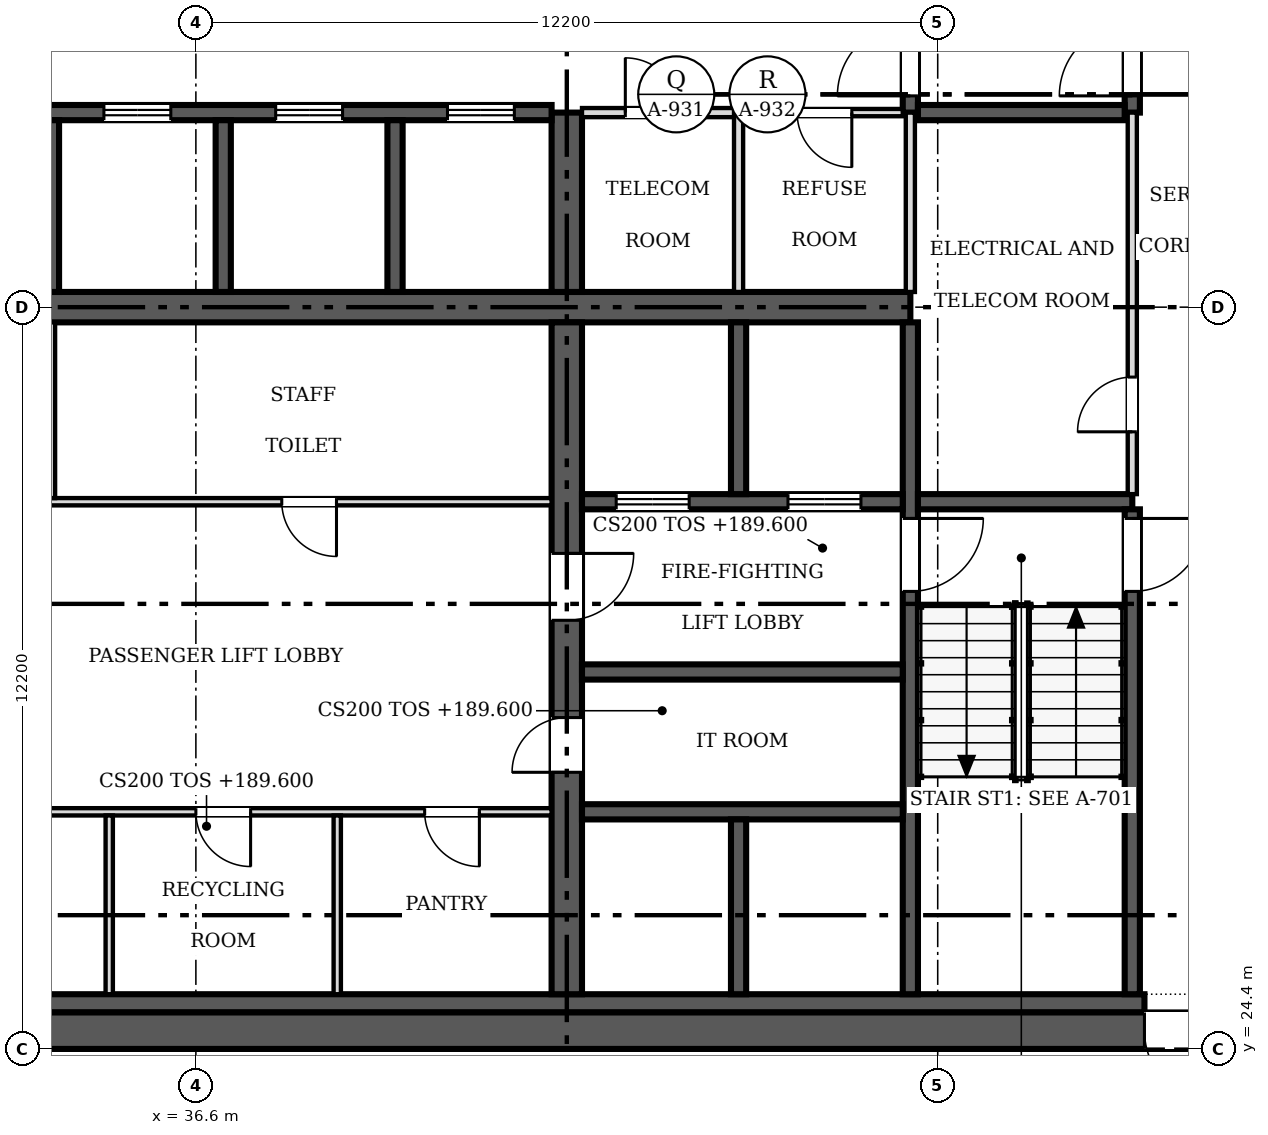
"""IFC4 building model, lengths in metres.
Left out: names, types, materials, properties, quantities, classifications, styles, units other than length and angle.
Written with IfcOpenShell. Run it as: python <this file> out.ifc"""

import sys

from ifc_helpers import new_model, si_unit, direction, frame, frame_2d, origin, place, context, subcontext, project, spatial, rectangle, extrude, source, transform, mapped, element, fill, save


model = new_model("IFC4")
c1 = context("Model", 3, precision=1e-05, world=origin(), true_north=direction((0.0, 1.0)))
c2 = subcontext(c1, "Body", "Model", "MODEL_VIEW")
j1 = project(units=[si_unit("LENGTHUNIT", "METRE"), si_unit("PLANEANGLEUNIT", "RADIAN")], contexts=[c1])
p1 = place(None, origin())
s1 = spatial("IfcSite", under=j1, at=p1, CompositionType="ELEMENT")
p2 = place(p1, origin())
s2 = spatial("IfcBuilding", under=s1, at=p2, CompositionType="ELEMENT")
p3 = place(p2, frame((0.0, 0.0, 189.6)))
s3 = spatial("IfcBuildingStorey", under=s2, at=p3, CompositionType="ELEMENT", Elevation=189.6)
p4 = place(p3, frame((54.9, 24.7, 0.0), z_axis=(0.0, 0.0, 1.0), x_axis=(-1.0, 0.0, 0.0)))
e1 = element("IfcWall", 1, at=p4, inside=s3, PredefinedType="SHEAR", context=c2, shape_type="SweptSolid", body=[
    extrude(rectangle(XDim=24.4, YDim=0.6, at=frame_2d((12.2, 0.0))), origin(), (0.0, 0.0, 1.0), 3.8),
])
m1 = source(origin(), c2, "Body", "SweptSolid", [
    extrude(rectangle(XDim=1.2, YDim=2.1, at=frame_2d((0.6, 1.05))), frame((0.0, 0.31, 0.0), z_axis=(0.0, -1.0, 0.0), x_axis=(1.0, 0.0, 0.0)), (0.0, 0.0, 1.0), 0.62),
])
p5 = place(p4, frame((1.5, 0.0, 0.0)))
e2 = element("IfcOpeningElement", 2, at=p5, cuts=e1, PredefinedType="OPENING", context=c2, shape_type="MappedRepresentation", body=[
    mapped(m1, transform((0.0, 0.0, 0.0), scale=1.0)),
])
p6 = place(p3, frame((31.1, 25.15, 0.0), z_axis=(0.0, 0.0, 1.0), x_axis=(1.0, 0.0, 0.0)))
e3 = element("IfcWall", 3, at=p6, inside=s3, PredefinedType="SOLIDWALL", context=c2, shape_type="SweptSolid", body=[
    extrude(rectangle(XDim=21.1, YDim=0.3, at=frame_2d((10.55, 0.0))), origin(), (0.0, 0.0, 1.0), 3.8),
])
p7 = place(p3, frame((31.4, 36.6, 0.0), z_axis=(0.0, 0.0, 1.0), x_axis=(1.0, 0.0, 0.0)))
e4 = element("IfcWall", 4, at=p7, inside=s3, PredefinedType="SHEAR", context=c2, shape_type="SweptSolid", body=[
    extrude(rectangle(XDim=16.95, YDim=0.5, at=frame_2d((8.475, 0.0))), origin(), (0.0, 0.0, 1.0), 3.8),
])
p8 = place(p3, frame((42.7, 36.35, 0.0), z_axis=(0.0, 0.0, 1.0), x_axis=(0.0, -1.0, 0.0)))
e5 = element("IfcWall", 5, at=p8, inside=s3, PredefinedType="SHEAR", context=c2, shape_type="SweptSolid", body=[
    extrude(rectangle(XDim=11.05, YDim=0.5, at=frame_2d((5.525, 0.0))), origin(), (0.0, 0.0, 1.0), 3.8),
])
m2 = source(origin(), c2, "Body", "SweptSolid", [
    extrude(rectangle(XDim=0.9, YDim=2.1, at=frame_2d((0.45, 1.05))), frame((0.0, 0.26, 0.0), z_axis=(0.0, -1.0, 0.0), x_axis=(1.0, 0.0, 0.0)), (0.0, 0.0, 1.0), 0.52),
])
p9 = place(p8, frame((6.5, 0.0, 0.0)))
e6 = element("IfcOpeningElement", 6, at=p9, cuts=e5, PredefinedType="OPENING", context=c2, shape_type="MappedRepresentation", body=[
    mapped(m2, transform((0.0, 0.0, 0.0), scale=1.0)),
])
m3 = source(origin(), c2, "Body", "SweptSolid", [
    extrude(rectangle(XDim=1.1, YDim=2.1, at=frame_2d((0.55, 1.05))), frame((0.0, 0.26, 0.0), z_axis=(0.0, -1.0, 0.0), x_axis=(1.0, 0.0, 0.0)), (0.0, 0.0, 1.0), 0.52),
])
p10 = place(p8, frame((3.8, 0.0, 0.0)))
e7 = element("IfcOpeningElement", 7, at=p10, cuts=e5, PredefinedType="OPENING", context=c2, shape_type="MappedRepresentation", body=[
    mapped(m3, transform((0.0, 0.0, 0.0), scale=1.0)),
])
p11 = place(p3, frame((42.7, 36.85, 0.0), z_axis=(0.0, 0.0, 1.0), x_axis=(0.0, 1.0, 0.0)))
e8 = element("IfcWall", 8, at=p11, inside=s3, PredefinedType="SHEAR", context=c2, shape_type="SweptSolid", body=[
    extrude(rectangle(XDim=2.95, YDim=0.5, at=frame_2d((1.475, 0.0))), origin(), (0.0, 0.0, 1.0), 3.8),
])
p12 = place(p3, frame((31.4, 39.8, 0.0), z_axis=(0.0, 0.0, 1.0), x_axis=(1.0, 0.0, 0.0)))
e9 = element("IfcWall", 9, at=p12, inside=s3, PredefinedType="SOLIDWALL", context=c2, shape_type="SweptSolid", body=[
    extrude(rectangle(XDim=11.05, YDim=0.25, at=frame_2d((5.525, 0.0))), origin(), (0.0, 0.0, 1.0), 3.8),
])
m4 = source(origin(), c2, "Body", "SweptSolid", [
    extrude(rectangle(XDim=1.1, YDim=2.1, at=frame_2d((0.55, 1.05))), frame((0.0, 0.135, 0.0), z_axis=(0.0, -1.0, 0.0), x_axis=(1.0, 0.0, 0.0)), (0.0, 0.0, 1.0), 0.27),
])
p13 = place(p12, frame((0.863, 0.0, 0.0)))
e10 = element("IfcOpeningElement", 10, at=p13, cuts=e9, PredefinedType="OPENING", context=c2, shape_type="MappedRepresentation", body=[
    mapped(m4, transform((0.0, 0.0, 0.0), scale=1.0)),
])
p14 = place(p12, frame((3.688, 0.0, 0.0)))
e11 = element("IfcOpeningElement", 11, at=p14, cuts=e9, PredefinedType="OPENING", context=c2, shape_type="MappedRepresentation", body=[
    mapped(m4, transform((0.0, 0.0, 0.0), scale=1.0)),
])
p15 = place(p12, frame((6.512, 0.0, 0.0)))
e12 = element("IfcOpeningElement", 12, at=p15, cuts=e9, PredefinedType="OPENING", context=c2, shape_type="MappedRepresentation", body=[
    mapped(m4, transform((0.0, 0.0, 0.0), scale=1.0)),
])
p16 = place(p12, frame((9.337, 0.0, 0.0)))
e13 = element("IfcOpeningElement", 13, at=p16, cuts=e9, PredefinedType="OPENING", context=c2, shape_type="MappedRepresentation", body=[
    mapped(m4, transform((0.0, 0.0, 0.0), scale=1.0)),
])
p17 = place(p3, frame((48.35, 36.35, 0.0), z_axis=(0.0, 0.0, 1.0), x_axis=(0.0, -1.0, 0.0)))
e14 = element("IfcWall", 14, at=p17, inside=s3, PredefinedType="SOLIDWALL", context=c2, shape_type="SweptSolid", body=[
    extrude(rectangle(XDim=11.05, YDim=0.25, at=frame_2d((5.525, 0.0))), origin(), (0.0, 0.0, 1.0), 3.8),
])
m5 = source(origin(), c2, "Body", "SweptSolid", [
    extrude(rectangle(XDim=1.2, YDim=2.1, at=frame_2d((0.6, 1.05))), frame((0.0, 0.135, 0.0), z_axis=(0.0, -1.0, 0.0), x_axis=(1.0, 0.0, 0.0)), (0.0, 0.0, 1.0), 0.27),
])
p18 = place(p17, frame((3.225, 0.0, 0.0)))
e15 = element("IfcOpeningElement", 15, at=p18, cuts=e14, PredefinedType="OPENING", context=c2, shape_type="MappedRepresentation", body=[
    mapped(m5, transform((0.0, 0.0, 0.0), scale=1.0)),
])
p19 = place(p3, frame((48.225, 33.4, 0.0), z_axis=(0.0, 0.0, 1.0), x_axis=(-1.0, 0.0, 0.0)))
e16 = element("IfcWall", 16, at=p19, inside=s3, PredefinedType="SOLIDWALL", context=c2, shape_type="SweptSolid", body=[
    extrude(rectangle(XDim=5.275, YDim=0.25, at=frame_2d((2.638, 0.0))), origin(), (0.0, 0.0, 1.0), 3.8),
])
p20 = place(p19, frame((3.512, 0.0, 0.0)))
e17 = element("IfcOpeningElement", 17, at=p20, cuts=e16, PredefinedType="OPENING", context=c2, shape_type="MappedRepresentation", body=[
    mapped(m5, transform((0.0, 0.0, 0.0), scale=1.0)),
])
p21 = place(p19, frame((0.688, 0.0, 0.0)))
e18 = element("IfcOpeningElement", 18, at=p21, cuts=e16, PredefinedType="OPENING", context=c2, shape_type="MappedRepresentation", body=[
    mapped(m5, transform((0.0, 0.0, 0.0), scale=1.0)),
])
p22 = place(p3, frame((48.475, 33.4, 0.0), z_axis=(0.0, 0.0, 1.0), x_axis=(1.0, 0.0, 0.0)))
e19 = element("IfcWall", 19, at=p22, inside=s3, PredefinedType="SOLIDWALL", context=c2, shape_type="SweptSolid", body=[
    extrude(rectangle(XDim=3.525, YDim=0.25, at=frame_2d((1.762, 0.0))), origin(), (0.0, 0.0, 1.0), 3.8),
])
p23 = place(p3, frame((48.35, 47.9, 0.0), z_axis=(0.0, 0.0, 1.0), x_axis=(0.0, -1.0, 0.0)))
e20 = element("IfcWall", 20, at=p23, inside=s3, PredefinedType="SOLIDWALL", context=c2, shape_type="SweptSolid", body=[
    extrude(rectangle(XDim=8.1, YDim=0.25, at=frame_2d((4.05, 0.0))), origin(), (0.0, 0.0, 1.0), 3.8),
])
p24 = place(p23, frame((6.625, 0.0, 0.0)))
e21 = element("IfcOpeningElement", 21, at=p24, cuts=e20, PredefinedType="OPENING", context=c2, shape_type="MappedRepresentation", body=[
    mapped(m5, transform((0.0, 0.0, 0.0), scale=1.0)),
])
p25 = place(p3, frame((52.0, 25.3, 0.0), z_axis=(0.0, 0.0, 1.0), x_axis=(0.0, 1.0, 0.0)))
e22 = element("IfcWall", 22, at=p25, inside=s3, PredefinedType="SOLIDWALL", context=c2, shape_type="SweptSolid", body=[
    extrude(rectangle(XDim=7.975, YDim=0.25, at=frame_2d((3.987, 0.0))), origin(), (0.0, 0.0, 1.0), 3.8),
])
p26 = place(p25, frame((6.625, 0.0, 0.0)))
e23 = element("IfcOpeningElement", 23, at=p26, cuts=e22, PredefinedType="OPENING", context=c2, shape_type="MappedRepresentation", body=[
    mapped(m5, transform((0.0, 0.0, 0.0), scale=1.0)),
])
p27 = place(p3, frame((52.0, 39.8, 0.0), z_axis=(0.0, 0.0, 1.0), x_axis=(0.0, 1.0, 0.0)))
e24 = element("IfcWall", 24, at=p27, inside=s3, PredefinedType="SOLIDWALL", context=c2, shape_type="SweptSolid", body=[
    extrude(rectangle(XDim=8.1, YDim=0.25, at=frame_2d((4.05, 0.0))), origin(), (0.0, 0.0, 1.0), 3.8),
])
p28 = place(p27, frame((0.275, 0.0, 0.0)))
e25 = element("IfcOpeningElement", 25, at=p28, cuts=e24, PredefinedType="OPENING", context=c2, shape_type="MappedRepresentation", body=[
    mapped(m5, transform((0.0, 0.0, 0.0), scale=1.0)),
])
for number, where, z_axis, x_axis in (
    (26, (42.95, 28.3, 0.0), (0.0, 0.0, 1.0), (1.0, 0.0, 0.0)),
    (27, (42.95, 30.6, 0.0), (0.0, 0.0, 1.0), (1.0, 0.0, 0.0)),
):
    element("IfcWall", number, at=place(p3, frame(where, z_axis=z_axis, x_axis=x_axis)), inside=s3, PredefinedType="SOLIDWALL", context=c2, shape_type="SweptSolid", body=[
        extrude(rectangle(XDim=5.275, YDim=0.25, at=frame_2d((2.638, 0.0))), origin(), (0.0, 0.0, 1.0), 3.8),
    ])
p29 = place(p3, frame((48.475, 39.8, 0.0), z_axis=(0.0, 0.0, 1.0), x_axis=(1.0, 0.0, 0.0)))
e28 = element("IfcWall", 28, at=p29, inside=s3, PredefinedType="SOLIDWALL", context=c2, shape_type="SweptSolid", body=[
    extrude(rectangle(XDim=3.4, YDim=0.25, at=frame_2d((1.7, 0.0))), origin(), (0.0, 0.0, 1.0), 3.8),
])
for number, where, z_axis, x_axis in (
    (29, (34.225, 36.85, 0.0), (0.0, 0.0, 1.0), (0.0, 1.0, 0.0)),
    (30, (37.05, 36.85, 0.0), (0.0, 0.0, 1.0), (0.0, 1.0, 0.0)),
    (31, (39.875, 36.85, 0.0), (0.0, 0.0, 1.0), (0.0, 1.0, 0.0)),
):
    element("IfcWall", number, at=place(p3, frame(where, z_axis=z_axis, x_axis=x_axis)), inside=s3, PredefinedType="SOLIDWALL", context=c2, shape_type="SweptSolid", body=[
        extrude(rectangle(XDim=2.825, YDim=0.25, at=frame_2d((1.413, 0.0))), origin(), (0.0, 0.0, 1.0), 3.8),
    ])
p30 = place(p3, frame((45.525, 33.525, 0.0), z_axis=(0.0, 0.0, 1.0), x_axis=(0.0, 1.0, 0.0)))
e32 = element("IfcWall", 32, at=p30, inside=s3, PredefinedType="SOLIDWALL", context=c2, shape_type="SweptSolid", body=[
    extrude(rectangle(XDim=2.825, YDim=0.25, at=frame_2d((1.413, 0.0))), origin(), (0.0, 0.0, 1.0), 3.8),
])
p31 = place(p3, frame((45.525, 25.3, 0.0), z_axis=(0.0, 0.0, 1.0), x_axis=(0.0, 1.0, 0.0)))
e33 = element("IfcWall", 33, at=p31, inside=s3, PredefinedType="SOLIDWALL", context=c2, shape_type="SweptSolid", body=[
    extrude(rectangle(XDim=2.875, YDim=0.25, at=frame_2d((1.438, 0.0))), origin(), (0.0, 0.0, 1.0), 3.8),
])
p32 = place(p3, frame((42.45, 28.3, 0.0), z_axis=(0.0, 0.0, 1.0), x_axis=(-1.0, 0.0, 0.0)))
e34 = element("IfcWall", 34, at=p32, inside=s3, PredefinedType="PARTITIONING", context=c2, shape_type="SweptSolid", body=[
    extrude(rectangle(XDim=11.05, YDim=0.12, at=frame_2d((5.525, 0.0))), origin(), (0.0, 0.0, 1.0), 3.55),
])
m6 = source(origin(), c2, "Body", "SweptSolid", [
    extrude(rectangle(XDim=0.9, YDim=2.1, at=frame_2d((0.45, 1.05))), frame((0.0, 0.07, 0.0), z_axis=(0.0, -1.0, 0.0), x_axis=(1.0, 0.0, 0.0)), (0.0, 0.0, 1.0), 0.14),
])
p33 = place(p32, frame((8.712, 0.0, 0.0)))
e35 = element("IfcOpeningElement", 35, at=p33, cuts=e34, PredefinedType="OPENING", context=c2, shape_type="MappedRepresentation", body=[
    mapped(m6, transform((0.0, 0.0, 0.0), scale=1.0)),
])
p34 = place(p32, frame((4.95, 0.0, 0.0)))
e36 = element("IfcOpeningElement", 36, at=p34, cuts=e34, PredefinedType="OPENING", context=c2, shape_type="MappedRepresentation", body=[
    mapped(m6, transform((0.0, 0.0, 0.0), scale=1.0)),
])
p35 = place(p32, frame((1.188, 0.0, 0.0)))
e37 = element("IfcOpeningElement", 37, at=p35, cuts=e34, PredefinedType="OPENING", context=c2, shape_type="MappedRepresentation", body=[
    mapped(m6, transform((0.0, 0.0, 0.0), scale=1.0)),
])
p36 = place(p3, frame((31.4, 33.4, 0.0), z_axis=(0.0, 0.0, 1.0), x_axis=(1.0, 0.0, 0.0)))
e38 = element("IfcWall", 38, at=p36, inside=s3, PredefinedType="PARTITIONING", context=c2, shape_type="SweptSolid", body=[
    extrude(rectangle(XDim=11.05, YDim=0.12, at=frame_2d((5.525, 0.0))), origin(), (0.0, 0.0, 1.0), 3.55),
])
p37 = place(p36, frame((0.962, 0.0, 0.0)))
e39 = element("IfcOpeningElement", 39, at=p37, cuts=e38, PredefinedType="OPENING", context=c2, shape_type="MappedRepresentation", body=[
    mapped(m6, transform((0.0, 0.0, 0.0), scale=1.0)),
])
p38 = place(p36, frame((6.613, 0.0, 0.0)))
e40 = element("IfcOpeningElement", 40, at=p38, cuts=e38, PredefinedType="OPENING", context=c2, shape_type="MappedRepresentation", body=[
    mapped(m6, transform((0.0, 0.0, 0.0), scale=1.0)),
])
p39 = place(p3, frame((52.0, 33.525, 0.0), z_axis=(0.0, 0.0, 1.0), x_axis=(0.0, 1.0, 0.0)))
e41 = element("IfcWall", 41, at=p39, inside=s3, PredefinedType="PARTITIONING", context=c2, shape_type="SweptSolid", body=[
    extrude(rectangle(XDim=6.275, YDim=0.15, at=frame_2d((3.138, 0.0))), origin(), (0.0, 0.0, 1.0), 3.55),
])
m7 = source(origin(), c2, "Body", "SweptSolid", [
    extrude(rectangle(XDim=0.9, YDim=2.1, at=frame_2d((0.45, 1.05))), frame((0.0, 0.085, 0.0), z_axis=(0.0, -1.0, 0.0), x_axis=(1.0, 0.0, 0.0)), (0.0, 0.0, 1.0), 0.17),
])
p40 = place(p39, frame((1.025, 0.0, 0.0)))
e42 = element("IfcOpeningElement", 42, at=p40, cuts=e41, PredefinedType="OPENING", context=c2, shape_type="MappedRepresentation", body=[
    mapped(m7, transform((0.0, 0.0, 0.0), scale=1.0)),
])
for number, where, z_axis, x_axis in (
    (43, (45.525, 36.85, 0.0), (0.0, 0.0, 1.0), (0.0, 1.0, 0.0)),
    (44, (48.35, 36.85, 0.0), (0.0, 0.0, 1.0), (0.0, 1.0, 0.0)),
):
    element("IfcWall", number, at=place(p3, frame(where, z_axis=z_axis, x_axis=x_axis)), inside=s3, PredefinedType="PARTITIONING", context=c2, shape_type="SweptSolid", body=[
        extrude(rectangle(XDim=2.95, YDim=0.15, at=frame_2d((1.475, 0.0))), origin(), (0.0, 0.0, 1.0), 3.55),
    ])
p41 = place(p3, frame((34.225, 33.46, 0.0), z_axis=(0.0, 0.0, 1.0), x_axis=(0.0, 1.0, 0.0)))
e45 = element("IfcWall", 45, at=p41, inside=s3, PredefinedType="PARTITIONING", context=c2, shape_type="SweptSolid", body=[
    extrude(rectangle(XDim=2.89, YDim=0.12, at=frame_2d((1.445, 0.0))), origin(), (0.0, 0.0, 1.0), 3.55),
])
for number, where, z_axis, x_axis in (
    (46, (35.175, 25.3, 0.0), (0.0, 0.0, 1.0), (0.0, 1.0, 0.0)),
    (47, (38.925, 25.3, 0.0), (0.0, 0.0, 1.0), (0.0, 1.0, 0.0)),
):
    element("IfcWall", number, at=place(p3, frame(where, z_axis=z_axis, x_axis=x_axis)), inside=s3, PredefinedType="PARTITIONING", context=c2, shape_type="SweptSolid", body=[
        extrude(rectangle(XDim=2.94, YDim=0.12, at=frame_2d((1.47, 0.0))), origin(), (0.0, 0.0, 1.0), 3.55),
    ])
p42 = place(p3, frame((45.45, 39.8, 0.0), z_axis=(0.0, 0.0, 1.0), x_axis=(-1.0, 0.0, 0.0)))
e48 = element("IfcWall", 48, at=p42, inside=s3, PredefinedType="PARTITIONING", context=c2, shape_type="SweptSolid", body=[
    extrude(rectangle(XDim=2.5, YDim=0.15, at=frame_2d((1.25, 0.0))), origin(), (0.0, 0.0, 1.0), 3.55),
])
p43 = place(p42, frame((0.887, 0.0, 0.0)))
e49 = element("IfcOpeningElement", 49, at=p43, cuts=e48, PredefinedType="OPENING", context=c2, shape_type="MappedRepresentation", body=[
    mapped(m7, transform((0.0, 0.0, 0.0), scale=1.0)),
])
p44 = place(p3, frame((48.225, 39.8, 0.0), z_axis=(0.0, 0.0, 1.0), x_axis=(-1.0, 0.0, 0.0)))
e50 = element("IfcWall", 50, at=p44, inside=s3, PredefinedType="PARTITIONING", context=c2, shape_type="SweptSolid", body=[
    extrude(rectangle(XDim=2.625, YDim=0.12, at=frame_2d((1.312, 0.0))), origin(), (0.0, 0.0, 1.0), 3.55),
])
p45 = place(p44, frame((0.837, 0.0, 0.0)))
e51 = element("IfcOpeningElement", 51, at=p45, cuts=e50, PredefinedType="OPENING", context=c2, shape_type="MappedRepresentation", body=[
    mapped(m6, transform((0.0, 0.0, 0.0), scale=1.0)),
])
m8 = source(origin(), c2, "Body", "SweptSolid", [
    extrude(rectangle(XDim=1.2, YDim=2.1, at=frame_2d((0.6, 1.05))), frame((0.0, 0.025, 0.0), z_axis=(0.0, -1.0, 0.0), x_axis=(1.0, 0.0, 0.0)), (0.0, 0.0, 1.0), 0.05),
])
p46 = place(p5, origin())
e52 = element("IfcDoor", 52, at=p46, inside=s3, OperationType="SINGLE_SWING_LEFT", PredefinedType="DOOR", context=c2, shape_type="MappedRepresentation", body=[
    mapped(m8, transform((0.0, 0.0, 0.0), scale=1.0)),
])
fill(e2, e52)
m9 = source(origin(), c2, "Body", "SweptSolid", [
    extrude(rectangle(XDim=0.9, YDim=2.1, at=frame_2d((0.45, 1.05))), frame((0.0, 0.025, 0.0), z_axis=(0.0, -1.0, 0.0), x_axis=(1.0, 0.0, 0.0)), (0.0, 0.0, 1.0), 0.05),
])
p47 = place(p9, origin())
e53 = element("IfcDoor", 53, at=p47, inside=s3, OperationType="SINGLE_SWING_RIGHT", PredefinedType="DOOR", context=c2, shape_type="MappedRepresentation", body=[
    mapped(m9, transform((0.0, 0.0, 0.0), scale=1.0)),
])
fill(e6, e53)
m10 = source(origin(), c2, "Body", "SweptSolid", [
    extrude(rectangle(XDim=1.1, YDim=2.1, at=frame_2d((0.55, 1.05))), frame((0.0, 0.025, 0.0), z_axis=(0.0, -1.0, 0.0), x_axis=(1.0, 0.0, 0.0)), (0.0, 0.0, 1.0), 0.05),
])
p48 = place(p10, origin())
e54 = element("IfcDoor", 54, at=p48, inside=s3, OperationType="SINGLE_SWING_LEFT", PredefinedType="DOOR", context=c2, shape_type="MappedRepresentation", body=[
    mapped(m10, transform((0.0, 0.0, 0.0), scale=1.0)),
])
fill(e7, e54)
p49 = place(p14, origin())
e55 = element("IfcDoor", 55, at=p49, inside=s3, OperationType="DOUBLE_DOOR_SLIDING", PredefinedType="DOOR", context=c2, shape_type="MappedRepresentation", body=[
    mapped(m10, transform((0.0, 0.0, 0.0), scale=1.0)),
])
fill(e11, e55)
p50 = place(p15, origin())
e56 = element("IfcDoor", 56, at=p50, inside=s3, OperationType="DOUBLE_DOOR_SLIDING", PredefinedType="DOOR", context=c2, shape_type="MappedRepresentation", body=[
    mapped(m10, transform((0.0, 0.0, 0.0), scale=1.0)),
])
fill(e12, e56)
p51 = place(p16, origin())
e57 = element("IfcDoor", 57, at=p51, inside=s3, OperationType="DOUBLE_DOOR_SLIDING", PredefinedType="DOOR", context=c2, shape_type="MappedRepresentation", body=[
    mapped(m10, transform((0.0, 0.0, 0.0), scale=1.0)),
])
fill(e13, e57)
p52 = place(p18, origin())
e58 = element("IfcDoor", 58, at=p52, inside=s3, OperationType="SINGLE_SWING_LEFT", PredefinedType="DOOR", context=c2, shape_type="MappedRepresentation", body=[
    mapped(m8, transform((0.0, 0.0, 0.0), scale=1.0)),
])
fill(e15, e58)
p53 = place(p20, origin())
e59 = element("IfcDoor", 59, at=p53, inside=s3, OperationType="DOUBLE_DOOR_SLIDING", PredefinedType="DOOR", context=c2, shape_type="MappedRepresentation", body=[
    mapped(m8, transform((0.0, 0.0, 0.0), scale=1.0)),
])
fill(e17, e59)
p54 = place(p21, origin())
e60 = element("IfcDoor", 60, at=p54, inside=s3, OperationType="DOUBLE_DOOR_SLIDING", PredefinedType="DOOR", context=c2, shape_type="MappedRepresentation", body=[
    mapped(m8, transform((0.0, 0.0, 0.0), scale=1.0)),
])
fill(e18, e60)
p55 = place(p24, origin())
e61 = element("IfcDoor", 61, at=p55, inside=s3, OperationType="SINGLE_SWING_RIGHT", PredefinedType="DOOR", context=c2, shape_type="MappedRepresentation", body=[
    mapped(m8, transform((0.0, 0.0, 0.0), scale=1.0)),
])
fill(e21, e61)
p56 = place(p26, origin())
e62 = element("IfcDoor", 62, at=p56, inside=s3, OperationType="SINGLE_SWING_RIGHT", PredefinedType="DOOR", context=c2, shape_type="MappedRepresentation", body=[
    mapped(m8, transform((0.0, 0.0, 0.0), scale=1.0)),
])
fill(e23, e62)
p57 = place(p28, origin())
e63 = element("IfcDoor", 63, at=p57, inside=s3, OperationType="SINGLE_SWING_LEFT", PredefinedType="DOOR", context=c2, shape_type="MappedRepresentation", body=[
    mapped(m8, transform((0.0, 0.0, 0.0), scale=1.0)),
])
fill(e25, e63)
p58 = place(p34, origin())
e64 = element("IfcDoor", 64, at=p58, inside=s3, OperationType="SINGLE_SWING_LEFT", PredefinedType="DOOR", context=c2, shape_type="MappedRepresentation", body=[
    mapped(m9, transform((0.0, 0.0, 0.0), scale=1.0)),
])
fill(e36, e64)
p59 = place(p35, origin())
e65 = element("IfcDoor", 65, at=p59, inside=s3, OperationType="SINGLE_SWING_LEFT", PredefinedType="DOOR", context=c2, shape_type="MappedRepresentation", body=[
    mapped(m9, transform((0.0, 0.0, 0.0), scale=1.0)),
])
fill(e37, e65)
p60 = place(p38, origin())
e66 = element("IfcDoor", 66, at=p60, inside=s3, OperationType="SINGLE_SWING_RIGHT", PredefinedType="DOOR", context=c2, shape_type="MappedRepresentation", body=[
    mapped(m9, transform((0.0, 0.0, 0.0), scale=1.0)),
])
fill(e40, e66)
p61 = place(p40, origin())
e67 = element("IfcDoor", 67, at=p61, inside=s3, OperationType="SINGLE_SWING_LEFT", PredefinedType="DOOR", context=c2, shape_type="MappedRepresentation", body=[
    mapped(m9, transform((0.0, 0.0, 0.0), scale=1.0)),
])
fill(e42, e67)
p62 = place(p43, origin())
e68 = element("IfcDoor", 68, at=p62, inside=s3, OperationType="SINGLE_SWING_RIGHT", PredefinedType="DOOR", context=c2, shape_type="MappedRepresentation", body=[
    mapped(m9, transform((0.0, 0.0, 0.0), scale=1.0)),
])
fill(e49, e68)
p63 = place(p45, origin())
e69 = element("IfcDoor", 69, at=p63, inside=s3, OperationType="SINGLE_SWING_LEFT", PredefinedType="DOOR", context=c2, shape_type="MappedRepresentation", body=[
    mapped(m9, transform((0.0, 0.0, 0.0), scale=1.0)),
])
fill(e51, e69)
save(model, sys.argv[1])
